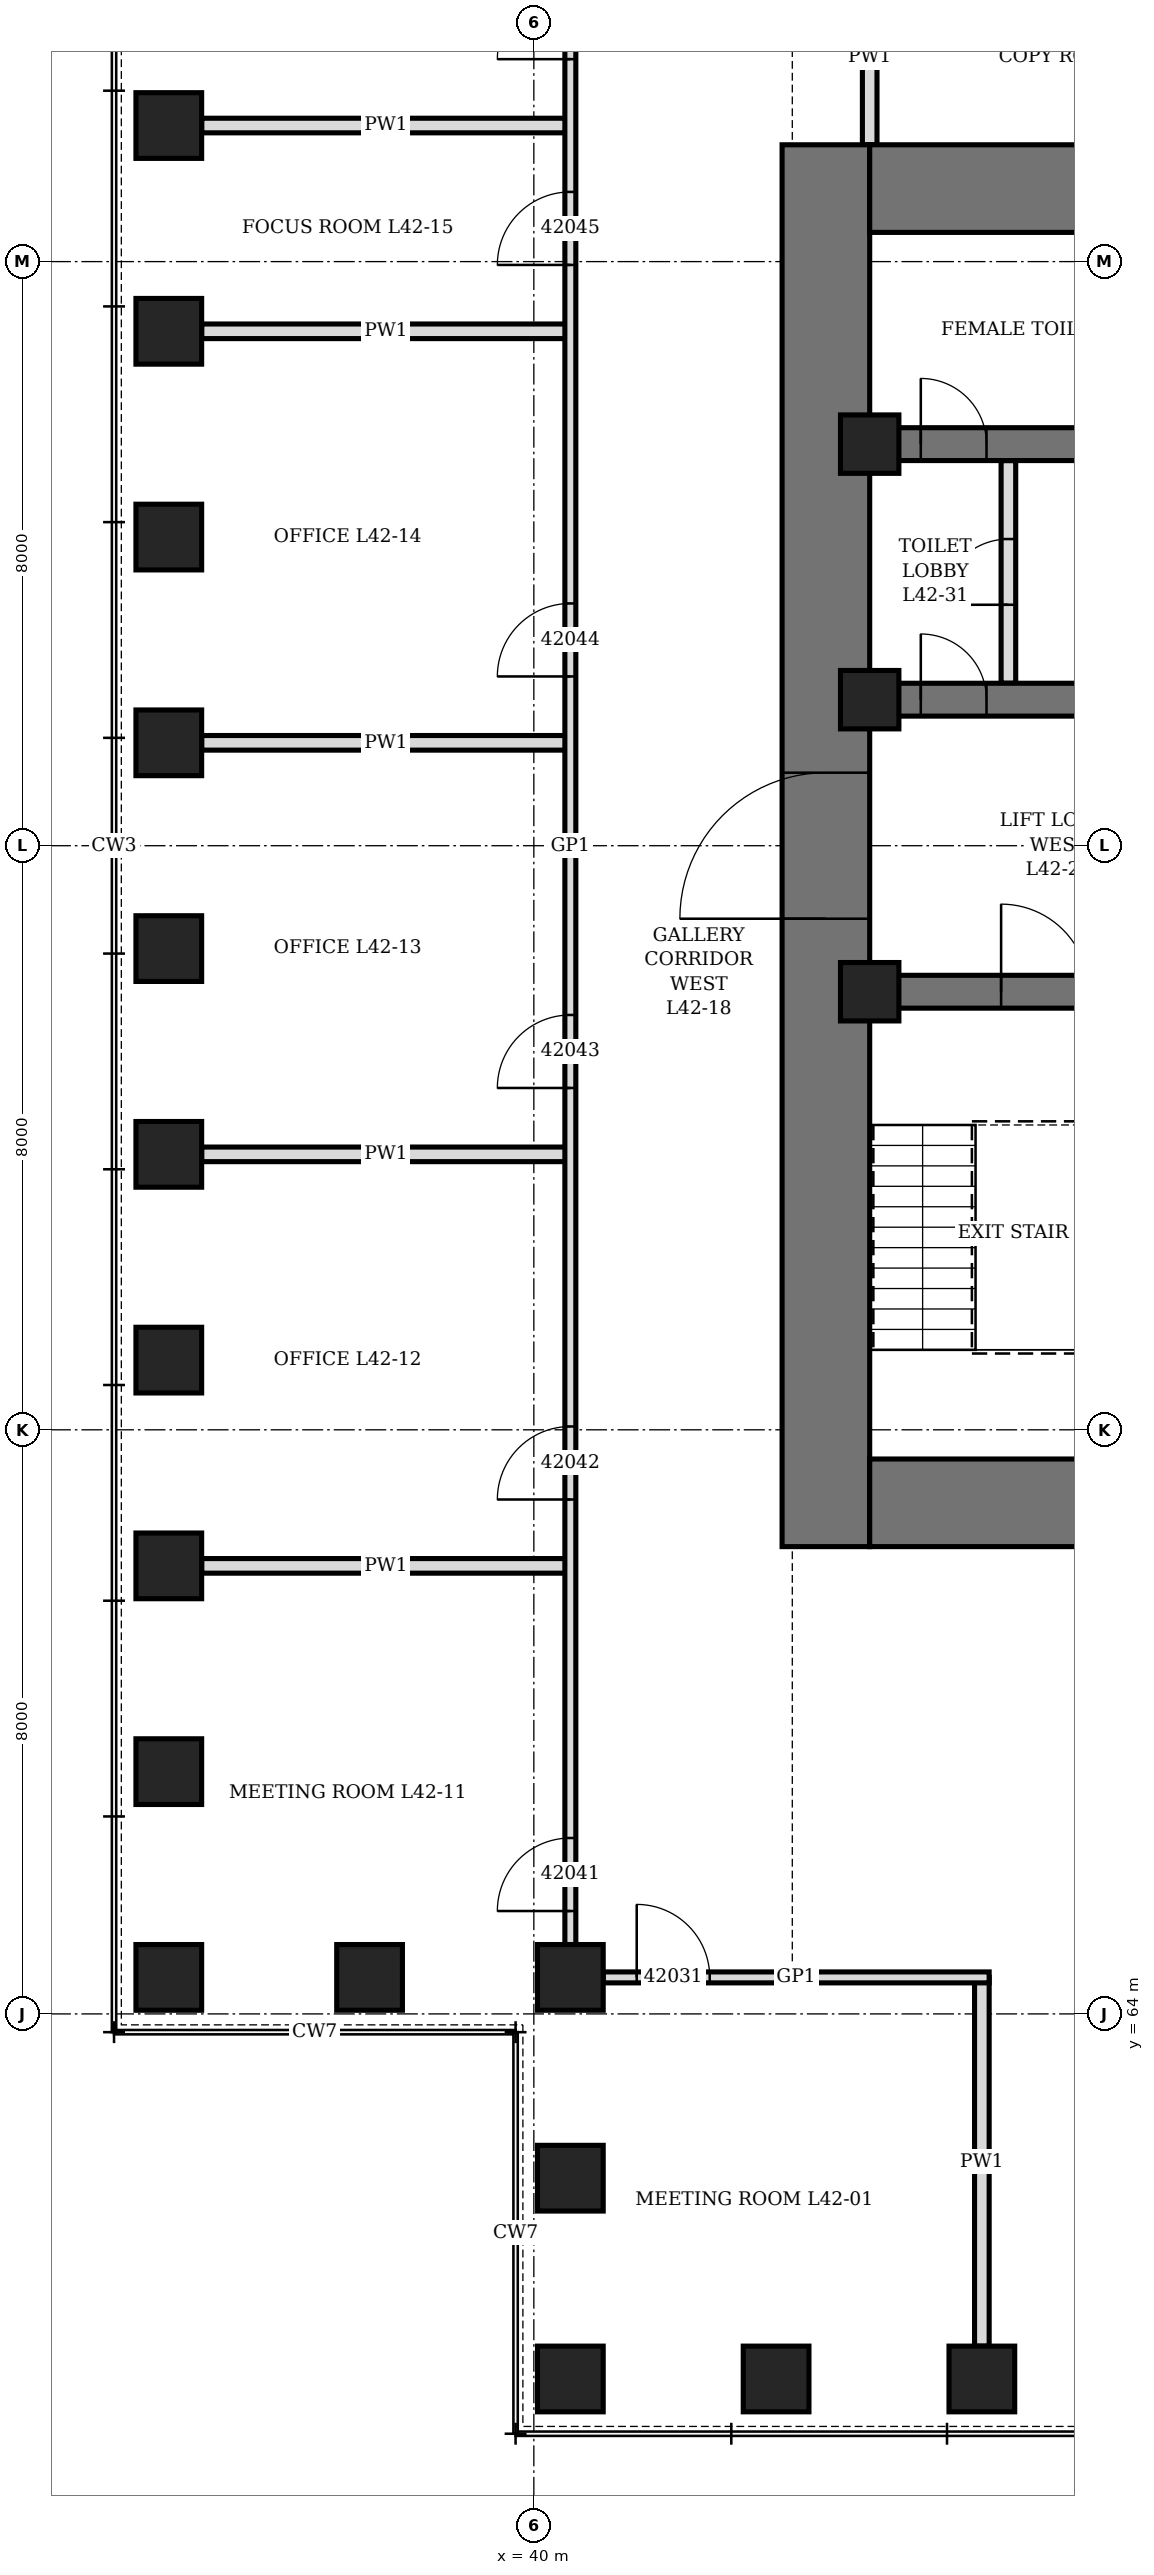
"""IFC4 building model, lengths in metres.
Left out: names, types, materials, properties, quantities, classifications, styles, units other than length and angle.
Written with IfcOpenShell. Run it as: python <this file> out.ifc"""

import sys

from ifc_helpers import new_model, si_unit, direction, frame, frame_2d, origin, origin_2d, place, context, subcontext, project, spatial, rectangle, hollow_rectangle, extrude, element, fill, save


model = new_model("IFC4")
c1 = context("Model", 3, precision=1e-05, world=origin(), true_north=direction((0.0, 1.0)))
c2 = subcontext(c1, "Body", "Model", "MODEL_VIEW")
j1 = project(units=[si_unit("LENGTHUNIT", "METRE"), si_unit("PLANEANGLEUNIT", "RADIAN")], contexts=[c1])
p1 = place(None, origin())
s1 = spatial("IfcSite", under=j1, at=p1, CompositionType="ELEMENT")
p2 = place(p1, origin())
s2 = spatial("IfcBuilding", under=s1, at=p2, CompositionType="ELEMENT")
p3 = place(p2, frame((0.0, 0.0, 189.7)))
s3 = spatial("IfcBuildingStorey", under=s2, at=p3, CompositionType="ELEMENT", Elevation=189.7)
for number, where, z_axis, x_axis in (
    (1, (40.5, 59.0, 0.0), (0.0, 0.0, 1.0), (1.0, 0.0, 0.0)),
    (2, (43.318, 59.0, 0.0), (0.0, 0.0, 1.0), (1.0, 0.0, 0.0)),
    (3, (46.136, 59.0, 0.0), (0.0, 0.0, 1.0), (1.0, 0.0, 0.0)),
    (4, (35.0, 89.864, 0.0), (0.0, 0.0, 1.0), (0.0, 1.0, 0.0)),
    (5, (35.0, 87.045, 0.0), (0.0, 0.0, 1.0), (0.0, 1.0, 0.0)),
    (6, (35.0, 84.227, 0.0), (0.0, 0.0, 1.0), (0.0, 1.0, 0.0)),
    (7, (35.0, 81.409, 0.0), (0.0, 0.0, 1.0), (0.0, 1.0, 0.0)),
    (8, (35.0, 78.591, 0.0), (0.0, 0.0, 1.0), (0.0, 1.0, 0.0)),
    (9, (35.0, 75.773, 0.0), (0.0, 0.0, 1.0), (0.0, 1.0, 0.0)),
    (10, (35.0, 72.955, 0.0), (0.0, 0.0, 1.0), (0.0, 1.0, 0.0)),
    (11, (35.0, 70.136, 0.0), (0.0, 0.0, 1.0), (0.0, 1.0, 0.0)),
    (12, (35.0, 67.318, 0.0), (0.0, 0.0, 1.0), (0.0, 1.0, 0.0)),
    (13, (35.0, 64.5, 0.0), (0.0, 0.0, 1.0), (1.0, 0.0, 0.0)),
    (14, (37.75, 64.5, 0.0), (0.0, 0.0, 1.0), (1.0, 0.0, 0.0)),
    (15, (40.5, 64.5, 0.0), (0.0, 0.0, 1.0), (0.0, 1.0, 0.0)),
    (16, (40.5, 61.75, 0.0), (0.0, 0.0, 1.0), (0.0, 1.0, 0.0)),
):
    element("IfcColumn", number, at=place(p3, frame(where, z_axis=z_axis, x_axis=x_axis)), inside=s3, PredefinedType="COLUMN", context=c2, shape_type="SweptSolid", body=[
        extrude(hollow_rectangle(XDim=0.9, YDim=0.9, WallThickness=0.12, at=origin_2d()), origin(), (0.0, 0.0, 1.0), 4.2),
    ])
p4 = place(p3, frame((44.0, 70.4, 0.0), z_axis=(0.0, 0.0, 1.0), x_axis=(0.0, 1.0, 0.0)))
e17 = element("IfcWall", 17, at=p4, inside=s3, PredefinedType="SHEAR", context=c2, shape_type="SweptSolid", body=[
    extrude(rectangle(XDim=19.2, YDim=1.2, at=frame_2d((9.6, 0.0))), origin(), (0.0, 0.0, 1.0), 4.2),
])
p5 = place(p4, frame((8.6, 0.0, 0.0)))
e18 = element("IfcOpeningElement", 18, at=p5, cuts=e17, PredefinedType="OPENING", context=c2, shape_type="SweptSolid", body=[
    extrude(rectangle(XDim=2.0, YDim=2.4, at=frame_2d((1.0, 1.2))), frame((0.0, 0.61, 0.0), z_axis=(0.0, -1.0, 0.0), x_axis=(1.0, 0.0, 0.0)), (0.0, 0.0, 1.0), 1.22),
])
p6 = place(p3, frame((44.6, 71.0, 0.0), z_axis=(0.0, 0.0, 1.0), x_axis=(1.0, 0.0, 0.0)))
e19 = element("IfcWall", 19, at=p6, inside=s3, PredefinedType="SHEAR", context=c2, shape_type="SweptSolid", body=[
    extrude(rectangle(XDim=22.8, YDim=1.2, at=frame_2d((11.4, 0.0))), origin(), (0.0, 0.0, 1.0), 4.2),
])
p7 = place(p6, frame((6.35, 0.0, 0.0)))
e20 = element("IfcOpeningElement", 20, at=p7, cuts=e19, PredefinedType="OPENING", context=c2, shape_type="SweptSolid", body=[
    extrude(rectangle(XDim=1.1, YDim=2.2, at=frame_2d((0.55, 1.1))), frame((0.0, 0.61, 0.0), z_axis=(0.0, -1.0, 0.0), x_axis=(1.0, 0.0, 0.0)), (0.0, 0.0, 1.0), 1.22),
])
p8 = place(p6, frame((9.35, 0.0, 0.0)))
e21 = element("IfcOpeningElement", 21, at=p8, cuts=e19, PredefinedType="OPENING", context=c2, shape_type="SweptSolid", body=[
    extrude(rectangle(XDim=1.1, YDim=2.2, at=frame_2d((0.55, 1.1))), frame((0.0, 0.61, 0.0), z_axis=(0.0, -1.0, 0.0), x_axis=(1.0, 0.0, 0.0)), (0.0, 0.0, 1.0), 1.22),
])
p9 = place(p6, frame((12.35, 0.0, 0.0)))
e22 = element("IfcOpeningElement", 22, at=p9, cuts=e19, PredefinedType="OPENING", context=c2, shape_type="SweptSolid", body=[
    extrude(rectangle(XDim=1.1, YDim=2.2, at=frame_2d((0.55, 1.1))), frame((0.0, 0.61, 0.0), z_axis=(0.0, -1.0, 0.0), x_axis=(1.0, 0.0, 0.0)), (0.0, 0.0, 1.0), 1.22),
])
p10 = place(p6, frame((15.35, 0.0, 0.0)))
e23 = element("IfcOpeningElement", 23, at=p10, cuts=e19, PredefinedType="OPENING", context=c2, shape_type="SweptSolid", body=[
    extrude(rectangle(XDim=1.1, YDim=2.2, at=frame_2d((0.55, 1.1))), frame((0.0, 0.61, 0.0), z_axis=(0.0, -1.0, 0.0), x_axis=(1.0, 0.0, 0.0)), (0.0, 0.0, 1.0), 1.22),
])
p11 = place(p3, frame((44.6, 89.0, 0.0), z_axis=(0.0, 0.0, 1.0), x_axis=(1.0, 0.0, 0.0)))
e24 = element("IfcWall", 24, at=p11, inside=s3, PredefinedType="SHEAR", context=c2, shape_type="SweptSolid", body=[
    extrude(rectangle(XDim=22.8, YDim=1.2, at=frame_2d((11.4, 0.0))), origin(), (0.0, 0.0, 1.0), 4.2),
])
p12 = place(p11, frame((7.9, 0.0, 0.0)))
e25 = element("IfcOpeningElement", 25, at=p12, cuts=e24, PredefinedType="OPENING", context=c2, shape_type="SweptSolid", body=[
    extrude(rectangle(XDim=1.0, YDim=2.1, at=frame_2d((0.5, 1.05))), frame((0.0, 0.61, 0.0), z_axis=(0.0, -1.0, 0.0), x_axis=(1.0, 0.0, 0.0)), (0.0, 0.0, 1.0), 1.22),
])
p13 = place(p11, frame((13.012, 0.0, 0.0)))
e26 = element("IfcOpeningElement", 26, at=p13, cuts=e24, PredefinedType="OPENING", context=c2, shape_type="SweptSolid", body=[
    extrude(rectangle(XDim=0.9, YDim=2.1, at=frame_2d((0.45, 1.05))), frame((0.0, 0.61, 0.0), z_axis=(0.0, -1.0, 0.0), x_axis=(1.0, 0.0, 0.0)), (0.0, 0.0, 1.0), 1.22),
])
p14 = place(p3, frame((44.6, 78.0, 0.0), z_axis=(0.0, 0.0, 1.0), x_axis=(1.0, 0.0, 0.0)))
e27 = element("IfcWall", 27, at=p14, inside=s3, PredefinedType="SHEAR", context=c2, shape_type="SweptSolid", body=[
    extrude(rectangle(XDim=5.175, YDim=0.45, at=frame_2d((2.587, 0.0))), origin(), (0.0, 0.0, 1.0), 4.2),
])
p15 = place(p14, frame((1.8, 0.0, 0.0)))
e28 = element("IfcOpeningElement", 28, at=p15, cuts=e27, PredefinedType="OPENING", context=c2, shape_type="SweptSolid", body=[
    extrude(rectangle(XDim=1.2, YDim=2.1, at=frame_2d((0.6, 1.05))), frame((0.0, 0.235, 0.0), z_axis=(0.0, -1.0, 0.0), x_axis=(1.0, 0.0, 0.0)), (0.0, 0.0, 1.0), 0.47),
])
p16 = place(p3, frame((44.6, 82.0, 0.0), z_axis=(0.0, 0.0, 1.0), x_axis=(1.0, 0.0, 0.0)))
e29 = element("IfcWall", 29, at=p16, inside=s3, PredefinedType="SHEAR", context=c2, shape_type="SweptSolid", body=[
    extrude(rectangle(XDim=5.175, YDim=0.45, at=frame_2d((2.587, 0.0))), origin(), (0.0, 0.0, 1.0), 4.2),
])
p17 = place(p16, frame((0.7, 0.0, 0.0)))
e30 = element("IfcOpeningElement", 30, at=p17, cuts=e29, PredefinedType="OPENING", context=c2, shape_type="SweptSolid", body=[
    extrude(rectangle(XDim=0.9, YDim=2.1, at=frame_2d((0.45, 1.05))), frame((0.0, 0.235, 0.0), z_axis=(0.0, -1.0, 0.0), x_axis=(1.0, 0.0, 0.0)), (0.0, 0.0, 1.0), 0.47),
])
p18 = place(p3, frame((44.6, 85.5, 0.0), z_axis=(0.0, 0.0, 1.0), x_axis=(1.0, 0.0, 0.0)))
e31 = element("IfcWall", 31, at=p18, inside=s3, PredefinedType="SHEAR", context=c2, shape_type="SweptSolid", body=[
    extrude(rectangle(XDim=5.175, YDim=0.45, at=frame_2d((2.587, 0.0))), origin(), (0.0, 0.0, 1.0), 4.2),
])
p19 = place(p18, frame((0.7, 0.0, 0.0)))
e32 = element("IfcOpeningElement", 32, at=p19, cuts=e31, PredefinedType="OPENING", context=c2, shape_type="SweptSolid", body=[
    extrude(rectangle(XDim=0.9, YDim=2.1, at=frame_2d((0.45, 1.05))), frame((0.0, 0.235, 0.0), z_axis=(0.0, -1.0, 0.0), x_axis=(1.0, 0.0, 0.0)), (0.0, 0.0, 1.0), 0.47),
])
for number, where, z_axis, x_axis in (
    (33, (44.6, 78.0, 0.0), (0.0, 0.0, 1.0), (1.0, 0.0, 0.0)),
    (34, (44.6, 82.0, 0.0), (0.0, 0.0, 1.0), (1.0, 0.0, 0.0)),
    (35, (44.6, 85.5, 0.0), (0.0, 0.0, 1.0), (1.0, 0.0, 0.0)),
):
    element("IfcColumn", number, at=place(p3, frame(where, z_axis=z_axis, x_axis=x_axis)), inside=s3, PredefinedType="COLUMN", context=c2, shape_type="SweptSolid", body=[
        extrude(hollow_rectangle(XDim=0.8, YDim=0.8, WallThickness=0.1, at=origin_2d()), origin(), (0.0, 0.0, 1.0), 4.2),
    ])
p20 = place(p3, frame((46.5, 82.225, 0.0), z_axis=(0.0, 0.0, 1.0), x_axis=(0.0, 1.0, 0.0)))
e36 = element("IfcWall", 36, at=p20, inside=s3, PredefinedType="PARTITIONING", context=c2, shape_type="SweptSolid", body=[
    extrude(rectangle(XDim=3.05, YDim=0.2, at=frame_2d((1.525, 0.0))), origin(), (0.0, 0.0, 1.0), 4.04),
])
p21 = place(p20, frame((1.075, 0.0, 0.0)))
e37 = element("IfcOpeningElement", 37, at=p21, cuts=e36, PredefinedType="OPENING", context=c2, shape_type="SweptSolid", body=[
    extrude(rectangle(XDim=0.9, YDim=2.1, at=frame_2d((0.45, 1.05))), frame((0.0, 0.11, 0.0), z_axis=(0.0, -1.0, 0.0), x_axis=(1.0, 0.0, 0.0)), (0.0, 0.0, 1.0), 0.22),
])
for number, where, z_axis, x_axis in (
    (38, (46.136, 59.45, 0.0), (0.0, 0.0, 1.0), (0.0, 1.0, 0.0)),
    (39, (35.45, 70.136, 0.0), (0.0, 0.0, 1.0), (1.0, 0.0, 0.0)),
    (40, (35.45, 75.773, 0.0), (0.0, 0.0, 1.0), (1.0, 0.0, 0.0)),
    (41, (35.45, 81.409, 0.0), (0.0, 0.0, 1.0), (1.0, 0.0, 0.0)),
    (42, (35.45, 87.045, 0.0), (0.0, 0.0, 1.0), (1.0, 0.0, 0.0)),
    (43, (35.45, 89.864, 0.0), (0.0, 0.0, 1.0), (1.0, 0.0, 0.0)),
):
    element("IfcWall", number, at=place(p3, frame(where, z_axis=z_axis, x_axis=x_axis)), inside=s3, PredefinedType="PARTITIONING", context=c2, shape_type="SweptSolid", body=[
        extrude(rectangle(XDim=5.05, YDim=0.2, at=frame_2d((2.525, 0.0))), origin(), (0.0, 0.0, 1.0), 3.428),
    ])
p22 = place(p3, frame((44.6, 89.6, 0.0), z_axis=(0.0, 0.0, 1.0), x_axis=(0.0, 1.0, 0.0)))
e44 = element("IfcWall", 44, at=p22, inside=s3, PredefinedType="PARTITIONING", context=c2, shape_type="SweptSolid", body=[
    extrude(rectangle(XDim=2.4, YDim=0.2, at=frame_2d((1.2, 0.0))), origin(), (0.0, 0.0, 1.0), 4.04),
])
p23 = place(p3, frame((40.95, 64.5, 0.0), z_axis=(0.0, 0.0, 1.0), x_axis=(1.0, 0.0, 0.0)))
e45 = element("IfcWall", 45, at=p23, inside=s3, PredefinedType="PARTITIONING", context=c2, shape_type="SweptSolid", body=[
    extrude(rectangle(XDim=5.286, YDim=0.15, at=frame_2d((2.643, 0.0))), origin(), (0.0, 0.0, 1.0), 4.04),
])
p24 = place(p23, frame((0.459, 0.0, 0.0)))
e46 = element("IfcOpeningElement", 46, at=p24, cuts=e45, PredefinedType="OPENING", context=c2, shape_type="SweptSolid", body=[
    extrude(rectangle(XDim=1.0, YDim=2.4, at=frame_2d((0.5, 1.2))), frame((0.0, 0.085, 0.0), z_axis=(0.0, -1.0, 0.0), x_axis=(1.0, 0.0, 0.0)), (0.0, 0.0, 1.0), 0.17),
])
p25 = place(p3, frame((40.5, 64.95, 0.0), z_axis=(0.0, 0.0, 1.0), x_axis=(0.0, 1.0, 0.0)))
e47 = element("IfcWall", 47, at=p25, inside=s3, PredefinedType="PARTITIONING", context=c2, shape_type="SweptSolid", body=[
    extrude(rectangle(XDim=30.1, YDim=0.15, at=frame_2d((15.05, 0.0))), origin(), (0.0, 0.0, 1.0), 4.04),
])
p26 = place(p25, frame((0.459, 0.0, 0.0)))
e48 = element("IfcOpeningElement", 48, at=p26, cuts=e47, PredefinedType="OPENING", context=c2, shape_type="SweptSolid", body=[
    extrude(rectangle(XDim=1.0, YDim=2.4, at=frame_2d((0.5, 1.2))), frame((0.0, 0.085, 0.0), z_axis=(0.0, -1.0, 0.0), x_axis=(1.0, 0.0, 0.0)), (0.0, 0.0, 1.0), 0.17),
])
p27 = place(p25, frame((6.095, 0.0, 0.0)))
e49 = element("IfcOpeningElement", 49, at=p27, cuts=e47, PredefinedType="OPENING", context=c2, shape_type="SweptSolid", body=[
    extrude(rectangle(XDim=1.0, YDim=2.1, at=frame_2d((0.5, 1.05))), frame((0.0, 0.085, 0.0), z_axis=(0.0, -1.0, 0.0), x_axis=(1.0, 0.0, 0.0)), (0.0, 0.0, 1.0), 0.17),
])
p28 = place(p25, frame((11.732, 0.0, 0.0)))
e50 = element("IfcOpeningElement", 50, at=p28, cuts=e47, PredefinedType="OPENING", context=c2, shape_type="SweptSolid", body=[
    extrude(rectangle(XDim=1.0, YDim=2.1, at=frame_2d((0.5, 1.05))), frame((0.0, 0.085, 0.0), z_axis=(0.0, -1.0, 0.0), x_axis=(1.0, 0.0, 0.0)), (0.0, 0.0, 1.0), 0.17),
])
p29 = place(p25, frame((17.368, 0.0, 0.0)))
e51 = element("IfcOpeningElement", 51, at=p29, cuts=e47, PredefinedType="OPENING", context=c2, shape_type="SweptSolid", body=[
    extrude(rectangle(XDim=1.0, YDim=2.1, at=frame_2d((0.5, 1.05))), frame((0.0, 0.085, 0.0), z_axis=(0.0, -1.0, 0.0), x_axis=(1.0, 0.0, 0.0)), (0.0, 0.0, 1.0), 0.17),
])
p30 = place(p25, frame((23.004, 0.0, 0.0)))
e52 = element("IfcOpeningElement", 52, at=p30, cuts=e47, PredefinedType="OPENING", context=c2, shape_type="SweptSolid", body=[
    extrude(rectangle(XDim=1.0, YDim=2.4, at=frame_2d((0.5, 1.2))), frame((0.0, 0.085, 0.0), z_axis=(0.0, -1.0, 0.0), x_axis=(1.0, 0.0, 0.0)), (0.0, 0.0, 1.0), 0.17),
])
p31 = place(p25, frame((25.823, 0.0, 0.0)))
e53 = element("IfcOpeningElement", 53, at=p31, cuts=e47, PredefinedType="OPENING", context=c2, shape_type="SweptSolid", body=[
    extrude(rectangle(XDim=1.0, YDim=2.4, at=frame_2d((0.5, 1.2))), frame((0.0, 0.085, 0.0), z_axis=(0.0, -1.0, 0.0), x_axis=(1.0, 0.0, 0.0)), (0.0, 0.0, 1.0), 0.17),
])
p32 = place(p17, origin())
e54 = element("IfcDoor", 54, at=p32, inside=s3, OperationType="SINGLE_SWING_LEFT", PredefinedType="DOOR", context=c2, shape_type="SweptSolid", body=[
    extrude(rectangle(XDim=0.9, YDim=2.1, at=frame_2d((0.45, 1.05))), frame((0.0, 0.225, 0.0), z_axis=(0.0, -1.0, 0.0), x_axis=(1.0, 0.0, 0.0)), (0.0, 0.0, 1.0), 0.449),
])
fill(e30, e54)
p33 = place(p21, origin())
e55 = element("IfcDoor", 55, at=p33, inside=s3, OperationType="SINGLE_SWING_RIGHT", PredefinedType="DOOR", context=c2, shape_type="SweptSolid", body=[
    extrude(rectangle(XDim=0.9, YDim=2.1, at=frame_2d((0.45, 1.05))), frame((0.0, 0.1, 0.0), z_axis=(0.0, -1.0, 0.0), x_axis=(1.0, 0.0, 0.0)), (0.0, 0.0, 1.0), 0.199),
])
fill(e37, e55)
p34 = place(p19, origin())
e56 = element("IfcDoor", 56, at=p34, inside=s3, OperationType="SINGLE_SWING_RIGHT", PredefinedType="DOOR", context=c2, shape_type="SweptSolid", body=[
    extrude(rectangle(XDim=0.9, YDim=2.1, at=frame_2d((0.45, 1.05))), frame((0.0, 0.225, 0.0), z_axis=(0.0, -1.0, 0.0), x_axis=(1.0, 0.0, 0.0)), (0.0, 0.0, 1.0), 0.449),
])
fill(e32, e56)
p35 = place(p15, origin())
e57 = element("IfcDoor", 57, at=p35, inside=s3, OperationType="SINGLE_SWING_LEFT", PredefinedType="DOOR", context=c2, shape_type="SweptSolid", body=[
    extrude(rectangle(XDim=1.2, YDim=2.1, at=frame_2d((0.6, 1.05))), frame((0.0, 0.225, 0.0), z_axis=(0.0, -1.0, 0.0), x_axis=(1.0, 0.0, 0.0)), (0.0, 0.0, 1.0), 0.449),
])
fill(e28, e57)
p36 = place(p5, origin())
e58 = element("IfcDoor", 58, at=p36, inside=s3, OperationType="DOUBLE_DOOR_SINGLE_SWING", PredefinedType="DOOR", context=c2, shape_type="SweptSolid", body=[
    extrude(rectangle(XDim=2.0, YDim=2.4, at=frame_2d((1.0, 1.2))), frame((0.0, 0.35, 0.0), z_axis=(0.0, -1.0, 0.0), x_axis=(1.0, 0.0, 0.0)), (0.0, 0.0, 1.0), 0.7),
])
fill(e18, e58)
p37 = place(p24, origin())
e59 = element("IfcDoor", 59, at=p37, inside=s3, OperationType="SINGLE_SWING_RIGHT", PredefinedType="DOOR", context=c2, shape_type="SweptSolid", body=[
    extrude(rectangle(XDim=1.0, YDim=2.4, at=frame_2d((0.5, 1.2))), frame((0.0, 0.075, 0.0), z_axis=(0.0, -1.0, 0.0), x_axis=(1.0, 0.0, 0.0)), (0.0, 0.0, 1.0), 0.149),
])
fill(e46, e59)
p38 = place(p26, origin())
e60 = element("IfcDoor", 60, at=p38, inside=s3, OperationType="SINGLE_SWING_RIGHT", PredefinedType="DOOR", context=c2, shape_type="SweptSolid", body=[
    extrude(rectangle(XDim=1.0, YDim=2.4, at=frame_2d((0.5, 1.2))), frame((0.0, 0.075, 0.0), z_axis=(0.0, -1.0, 0.0), x_axis=(1.0, 0.0, 0.0)), (0.0, 0.0, 1.0), 0.149),
])
fill(e48, e60)
p39 = place(p27, origin())
e61 = element("IfcDoor", 61, at=p39, inside=s3, OperationType="SINGLE_SWING_LEFT", PredefinedType="DOOR", context=c2, shape_type="SweptSolid", body=[
    extrude(rectangle(XDim=1.0, YDim=2.1, at=frame_2d((0.5, 1.05))), frame((0.0, 0.075, 0.0), z_axis=(0.0, -1.0, 0.0), x_axis=(1.0, 0.0, 0.0)), (0.0, 0.0, 1.0), 0.149),
])
fill(e49, e61)
p40 = place(p28, origin())
e62 = element("IfcDoor", 62, at=p40, inside=s3, OperationType="SINGLE_SWING_LEFT", PredefinedType="DOOR", context=c2, shape_type="SweptSolid", body=[
    extrude(rectangle(XDim=1.0, YDim=2.1, at=frame_2d((0.5, 1.05))), frame((0.0, 0.075, 0.0), z_axis=(0.0, -1.0, 0.0), x_axis=(1.0, 0.0, 0.0)), (0.0, 0.0, 1.0), 0.149),
])
fill(e50, e62)
p41 = place(p29, origin())
e63 = element("IfcDoor", 63, at=p41, inside=s3, OperationType="SINGLE_SWING_LEFT", PredefinedType="DOOR", context=c2, shape_type="SweptSolid", body=[
    extrude(rectangle(XDim=1.0, YDim=2.1, at=frame_2d((0.5, 1.05))), frame((0.0, 0.075, 0.0), z_axis=(0.0, -1.0, 0.0), x_axis=(1.0, 0.0, 0.0)), (0.0, 0.0, 1.0), 0.149),
])
fill(e51, e63)
p42 = place(p30, origin())
e64 = element("IfcDoor", 64, at=p42, inside=s3, OperationType="SINGLE_SWING_RIGHT", PredefinedType="DOOR", context=c2, shape_type="SweptSolid", body=[
    extrude(rectangle(XDim=1.0, YDim=2.4, at=frame_2d((0.5, 1.2))), frame((0.0, 0.075, 0.0), z_axis=(0.0, -1.0, 0.0), x_axis=(1.0, 0.0, 0.0)), (0.0, 0.0, 1.0), 0.149),
])
fill(e52, e64)
p43 = place(p31, origin())
e65 = element("IfcDoor", 65, at=p43, inside=s3, OperationType="SINGLE_SWING_RIGHT", PredefinedType="DOOR", context=c2, shape_type="SweptSolid", body=[
    extrude(rectangle(XDim=1.0, YDim=2.4, at=frame_2d((0.5, 1.2))), frame((0.0, 0.075, 0.0), z_axis=(0.0, -1.0, 0.0), x_axis=(1.0, 0.0, 0.0)), (0.0, 0.0, 1.0), 0.149),
])
fill(e53, e65)
save(model, sys.argv[1])
